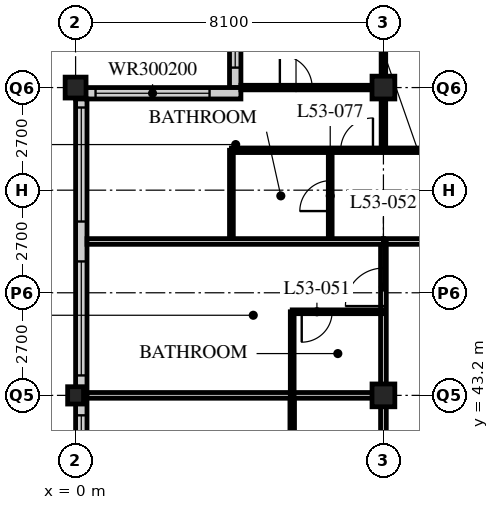
"""IFC4 building model, lengths in metres.
Left out: names, types, materials, properties, quantities, classifications, styles, units other than length and angle.
Written with IfcOpenShell. Run it as: python <this file> out.ifc"""

import sys

from ifc_helpers import new_model, si_unit, direction, frame, frame_2d, origin, origin_2d, place, context, subcontext, project, spatial, rectangle, hollow_rectangle, i_section, extrude, element, fill, save


model = new_model("IFC4")
c1 = context("Model", 3, precision=1e-05, world=origin(), true_north=direction((0.0, 1.0)))
c2 = subcontext(c1, "Body", "Model", "MODEL_VIEW")
j1 = project(units=[si_unit("LENGTHUNIT", "METRE"), si_unit("PLANEANGLEUNIT", "RADIAN")], contexts=[c1])
p1 = place(None, origin())
s1 = spatial("IfcSite", under=j1, at=p1, CompositionType="ELEMENT")
p2 = place(p1, origin())
s2 = spatial("IfcBuilding", under=s1, at=p2, CompositionType="ELEMENT")
p3 = place(p2, frame((0.0, 0.0, 206.4)))
s3 = spatial("IfcBuildingStorey", under=s2, at=p3, CompositionType="ELEMENT", Elevation=206.4)
p4 = place(p3, frame((0.0, 43.2, 0.0), z_axis=(0.0, 0.0, 1.0), x_axis=(1.0, 0.0, 0.0)))
e1 = element("IfcColumn", 1, at=p4, inside=s3, PredefinedType="COLUMN", context=c2, shape_type="SweptSolid", body=[
    extrude(i_section(OverallWidth=0.418, OverallDepth=0.456, WebThickness=0.042, FlangeThickness=0.067, FilletRadius=0.015, at=origin_2d()), origin(), (0.0, 0.0, 1.0), 3.6),
])
p5 = place(p3, frame((0.0, 51.3, 0.0), z_axis=(0.0, 0.0, 1.0), x_axis=(1.0, 0.0, 0.0)))
e2 = element("IfcColumn", 2, at=p5, inside=s3, PredefinedType="COLUMN", context=c2, shape_type="SweptSolid", body=[
    extrude(hollow_rectangle(XDim=0.55, YDim=0.55, WallThickness=0.045, at=origin_2d()), origin(), (0.0, 0.0, 1.0), 3.6),
])
for number, where, z_axis, x_axis in (
    (3, (8.1, 43.2, 0.0), (0.0, 0.0, 1.0), (1.0, 0.0, 0.0)),
    (4, (8.1, 51.3, 0.0), (0.0, 0.0, 1.0), (1.0, 0.0, 0.0)),
):
    element("IfcColumn", number, at=place(p3, frame(where, z_axis=z_axis, x_axis=x_axis)), inside=s3, PredefinedType="COLUMN", context=c2, shape_type="SweptSolid", body=[
        extrude(hollow_rectangle(XDim=0.6, YDim=0.6, WallThickness=0.05, at=origin_2d()), origin(), (0.0, 0.0, 1.0), 3.6),
    ])
p6 = place(p3, frame((4.2, 55.05, 0.0), z_axis=(0.0, 0.0, 1.0), x_axis=(0.0, -1.0, 0.0)))
e5 = element("IfcWall", 5, at=p6, inside=s3, PredefinedType="SOLIDWALL", context=c2, shape_type="SweptSolid", body=[
    extrude(rectangle(XDim=3.75, YDim=0.3, at=frame_2d((1.875, 0.0))), origin(), (0.0, 0.0, 1.0), 3.39),
])
p7 = place(p6, frame((0.225, 0.0, 0.6)))
e6 = element("IfcOpeningElement", 6, at=p7, cuts=e5, PredefinedType="OPENING", context=c2, shape_type="SweptSolid", body=[
    extrude(rectangle(XDim=3.0, YDim=2.0, at=frame_2d((1.5, 1.0))), frame((0.0, 0.16, 0.0), z_axis=(0.0, -1.0, 0.0), x_axis=(1.0, 0.0, 0.0)), (0.0, 0.0, 1.0), 0.32),
])
p8 = place(p3, frame((4.35, 51.15, 0.0), z_axis=(0.0, 0.0, 1.0), x_axis=(-1.0, 0.0, 0.0)))
e7 = element("IfcWall", 7, at=p8, inside=s3, PredefinedType="SOLIDWALL", context=c2, shape_type="SweptSolid", body=[
    extrude(rectangle(XDim=4.35, YDim=0.3, at=frame_2d((2.175, 0.0))), origin(), (0.0, 0.0, 1.0), 3.39),
])
p9 = place(p8, frame((0.825, 0.0, 0.6)))
e8 = element("IfcOpeningElement", 8, at=p9, cuts=e7, PredefinedType="OPENING", context=c2, shape_type="SweptSolid", body=[
    extrude(rectangle(XDim=3.0, YDim=2.0, at=frame_2d((1.5, 1.0))), frame((0.0, 0.16, 0.0), z_axis=(0.0, -1.0, 0.0), x_axis=(1.0, 0.0, 0.0)), (0.0, 0.0, 1.0), 0.32),
])
p10 = place(p3, frame((0.15, 51.0, 0.0), z_axis=(0.0, 0.0, 1.0), x_axis=(0.0, -1.0, 0.0)))
e9 = element("IfcWall", 9, at=p10, inside=s3, PredefinedType="SOLIDWALL", context=c2, shape_type="SweptSolid", body=[
    extrude(rectangle(XDim=32.1, YDim=0.3, at=frame_2d((16.05, 0.0))), origin(), (0.0, 0.0, 1.0), 3.39),
])
p11 = place(p10, frame((0.225, 0.0, 0.6)))
e10 = element("IfcOpeningElement", 10, at=p11, cuts=e9, PredefinedType="OPENING", context=c2, shape_type="SweptSolid", body=[
    extrude(rectangle(XDim=3.0, YDim=2.4, at=frame_2d((1.5, 1.2))), frame((0.0, 0.16, 0.0), z_axis=(0.0, -1.0, 0.0), x_axis=(1.0, 0.0, 0.0)), (0.0, 0.0, 1.0), 0.32),
])
p12 = place(p10, frame((4.275, 0.0, 0.6)))
e11 = element("IfcOpeningElement", 11, at=p12, cuts=e9, PredefinedType="OPENING", context=c2, shape_type="SweptSolid", body=[
    extrude(rectangle(XDim=3.0, YDim=2.4, at=frame_2d((1.5, 1.2))), frame((0.0, 0.16, 0.0), z_axis=(0.0, -1.0, 0.0), x_axis=(1.0, 0.0, 0.0)), (0.0, 0.0, 1.0), 0.32),
])
p13 = place(p10, frame((8.325, 0.0, 0.6)))
e12 = element("IfcOpeningElement", 12, at=p13, cuts=e9, PredefinedType="OPENING", context=c2, shape_type="SweptSolid", body=[
    extrude(rectangle(XDim=3.0, YDim=2.4, at=frame_2d((1.5, 1.2))), frame((0.0, 0.16, 0.0), z_axis=(0.0, -1.0, 0.0), x_axis=(1.0, 0.0, 0.0)), (0.0, 0.0, 1.0), 0.32),
])
p14 = place(p10, frame((12.375, 0.0, 0.6)))
e13 = element("IfcOpeningElement", 13, at=p14, cuts=e9, PredefinedType="OPENING", context=c2, shape_type="SweptSolid", body=[
    extrude(rectangle(XDim=3.0, YDim=2.4, at=frame_2d((1.5, 1.2))), frame((0.0, 0.16, 0.0), z_axis=(0.0, -1.0, 0.0), x_axis=(1.0, 0.0, 0.0)), (0.0, 0.0, 1.0), 0.32),
])
p15 = place(p10, frame((16.425, 0.0, 0.6)))
e14 = element("IfcOpeningElement", 14, at=p15, cuts=e9, PredefinedType="OPENING", context=c2, shape_type="SweptSolid", body=[
    extrude(rectangle(XDim=3.0, YDim=2.4, at=frame_2d((1.5, 1.2))), frame((0.0, 0.16, 0.0), z_axis=(0.0, -1.0, 0.0), x_axis=(1.0, 0.0, 0.0)), (0.0, 0.0, 1.0), 0.32),
])
p16 = place(p10, frame((20.475, 0.0, 0.6)))
e15 = element("IfcOpeningElement", 15, at=p16, cuts=e9, PredefinedType="OPENING", context=c2, shape_type="SweptSolid", body=[
    extrude(rectangle(XDim=3.0, YDim=2.4, at=frame_2d((1.5, 1.2))), frame((0.0, 0.16, 0.0), z_axis=(0.0, -1.0, 0.0), x_axis=(1.0, 0.0, 0.0)), (0.0, 0.0, 1.0), 0.32),
])
p17 = place(p10, frame((24.525, 0.0, 0.6)))
e16 = element("IfcOpeningElement", 16, at=p17, cuts=e9, PredefinedType="OPENING", context=c2, shape_type="SweptSolid", body=[
    extrude(rectangle(XDim=3.0, YDim=2.4, at=frame_2d((1.5, 1.2))), frame((0.0, 0.16, 0.0), z_axis=(0.0, -1.0, 0.0), x_axis=(1.0, 0.0, 0.0)), (0.0, 0.0, 1.0), 0.32),
])
p18 = place(p10, frame((28.575, 0.0, 0.6)))
e17 = element("IfcOpeningElement", 17, at=p18, cuts=e9, PredefinedType="OPENING", context=c2, shape_type="SweptSolid", body=[
    extrude(rectangle(XDim=3.0, YDim=2.4, at=frame_2d((1.5, 1.2))), frame((0.0, 0.16, 0.0), z_axis=(0.0, -1.0, 0.0), x_axis=(1.0, 0.0, 0.0)), (0.0, 0.0, 1.0), 0.32),
])
p19 = place(p3, frame((8.1, 47.25, 0.0), z_axis=(0.0, 0.0, 1.0), x_axis=(1.0, 0.0, 0.0)))
e18 = element("IfcWall", 18, at=p19, inside=s3, PredefinedType="PARTITIONING", context=c2, shape_type="SweptSolid", body=[
    extrude(rectangle(XDim=36.45, YDim=0.15, at=frame_2d((18.225, 0.0))), origin(), (0.0, 0.0, 1.0), 3.39),
])
p20 = place(p19, frame((4.45, 0.0, 0.0)))
e19 = element("IfcOpeningElement", 19, at=p20, cuts=e18, PredefinedType="OPENING", context=c2, shape_type="SweptSolid", body=[
    extrude(rectangle(XDim=1.0, YDim=2.1, at=frame_2d((0.5, 1.05))), frame((0.0, 0.085, 0.0), z_axis=(0.0, -1.0, 0.0), x_axis=(1.0, 0.0, 0.0)), (0.0, 0.0, 1.0), 0.17),
])
p21 = place(p19, frame((12.55, 0.0, 0.0)))
e20 = element("IfcOpeningElement", 20, at=p21, cuts=e18, PredefinedType="OPENING", context=c2, shape_type="SweptSolid", body=[
    extrude(rectangle(XDim=1.0, YDim=2.1, at=frame_2d((0.5, 1.05))), frame((0.0, 0.085, 0.0), z_axis=(0.0, -1.0, 0.0), x_axis=(1.0, 0.0, 0.0)), (0.0, 0.0, 1.0), 0.17),
])
p22 = place(p19, frame((30.7, 0.0, 0.0)))
e21 = element("IfcOpeningElement", 21, at=p22, cuts=e18, PredefinedType="OPENING", context=c2, shape_type="SweptSolid", body=[
    extrude(rectangle(XDim=1.0, YDim=2.1, at=frame_2d((0.5, 1.05))), frame((0.0, 0.085, 0.0), z_axis=(0.0, -1.0, 0.0), x_axis=(1.0, 0.0, 0.0)), (0.0, 0.0, 1.0), 0.17),
])
p23 = place(p19, frame((33.925, 0.0, 0.0)))
e22 = element("IfcOpeningElement", 22, at=p23, cuts=e18, PredefinedType="OPENING", context=c2, shape_type="SweptSolid", body=[
    extrude(rectangle(XDim=1.0, YDim=2.1, at=frame_2d((0.5, 1.05))), frame((0.0, 0.085, 0.0), z_axis=(0.0, -1.0, 0.0), x_axis=(1.0, 0.0, 0.0)), (0.0, 0.0, 1.0), 0.17),
])
p24 = place(p19, frame((1.525, 0.0, 0.0)))
e23 = element("IfcOpeningElement", 23, at=p24, cuts=e18, PredefinedType="OPENING", context=c2, shape_type="SweptSolid", body=[
    extrude(rectangle(XDim=1.0, YDim=2.1, at=frame_2d((0.5, 1.05))), frame((0.0, 0.085, 0.0), z_axis=(0.0, -1.0, 0.0), x_axis=(1.0, 0.0, 0.0)), (0.0, 0.0, 1.0), 0.17),
])
p25 = place(p3, frame((8.1, 18.9, 0.0), z_axis=(0.0, 0.0, 1.0), x_axis=(0.0, 1.0, 0.0)))
e24 = element("IfcWall", 24, at=p25, inside=s3, PredefinedType="PARTITIONING", context=c2, shape_type="SweptSolid", body=[
    extrude(rectangle(XDim=28.35, YDim=0.15, at=frame_2d((14.175, 0.0))), origin(), (0.0, 0.0, 1.0), 2.778),
])
p26 = place(p25, frame((0.9, 0.0, 0.0)))
e25 = element("IfcOpeningElement", 25, at=p26, cuts=e24, PredefinedType="OPENING", context=c2, shape_type="SweptSolid", body=[
    extrude(rectangle(XDim=1.0, YDim=2.1, at=frame_2d((0.5, 1.05))), frame((0.0, 0.085, 0.0), z_axis=(0.0, -1.0, 0.0), x_axis=(1.0, 0.0, 0.0)), (0.0, 0.0, 1.0), 0.17),
])
p27 = place(p25, frame((17.1, 0.0, 0.0)))
e26 = element("IfcOpeningElement", 26, at=p27, cuts=e24, PredefinedType="OPENING", context=c2, shape_type="SweptSolid", body=[
    extrude(rectangle(XDim=1.0, YDim=2.1, at=frame_2d((0.5, 1.05))), frame((0.0, 0.085, 0.0), z_axis=(0.0, -1.0, 0.0), x_axis=(1.0, 0.0, 0.0)), (0.0, 0.0, 1.0), 0.17),
])
p28 = place(p25, frame((26.65, 0.0, 0.0)))
e27 = element("IfcOpeningElement", 27, at=p28, cuts=e24, PredefinedType="OPENING", context=c2, shape_type="SweptSolid", body=[
    extrude(rectangle(XDim=1.0, YDim=2.1, at=frame_2d((0.5, 1.05))), frame((0.0, 0.085, 0.0), z_axis=(0.0, -1.0, 0.0), x_axis=(1.0, 0.0, 0.0)), (0.0, 0.0, 1.0), 0.17),
])
p29 = place(p3, frame((5.7, 18.9, 0.0), z_axis=(0.0, 0.0, 1.0), x_axis=(0.0, 1.0, 0.0)))
e28 = element("IfcWall", 28, at=p29, inside=s3, PredefinedType="PARTITIONING", context=c2, shape_type="SweptSolid", body=[
    extrude(rectangle(XDim=24.3, YDim=0.12, at=frame_2d((12.15, 0.0))), origin(), (0.0, 0.0, 1.0), 3.39),
])
p30 = place(p29, frame((0.975, 0.0, 0.0)))
e29 = element("IfcOpeningElement", 29, at=p30, cuts=e28, PredefinedType="OPENING", context=c2, shape_type="SweptSolid", body=[
    extrude(rectangle(XDim=0.85, YDim=2.1, at=frame_2d((0.425, 1.05))), frame((0.0, 0.07, 0.0), z_axis=(0.0, -1.0, 0.0), x_axis=(1.0, 0.0, 0.0)), (0.0, 0.0, 1.0), 0.14),
])
p31 = place(p29, frame((8.425, 0.0, 0.0)))
e30 = element("IfcOpeningElement", 30, at=p31, cuts=e28, PredefinedType="OPENING", context=c2, shape_type="SweptSolid", body=[
    extrude(rectangle(XDim=0.85, YDim=2.1, at=frame_2d((0.425, 1.05))), frame((0.0, 0.07, 0.0), z_axis=(0.0, -1.0, 0.0), x_axis=(1.0, 0.0, 0.0)), (0.0, 0.0, 1.0), 0.14),
])
p32 = place(p29, frame((12.475, 0.0, 0.0)))
e31 = element("IfcOpeningElement", 31, at=p32, cuts=e28, PredefinedType="OPENING", context=c2, shape_type="SweptSolid", body=[
    extrude(rectangle(XDim=0.85, YDim=2.1, at=frame_2d((0.425, 1.05))), frame((0.0, 0.07, 0.0), z_axis=(0.0, -1.0, 0.0), x_axis=(1.0, 0.0, 0.0)), (0.0, 0.0, 1.0), 0.14),
])
p33 = place(p29, frame((17.175, 0.0, 0.0)))
e32 = element("IfcOpeningElement", 32, at=p33, cuts=e28, PredefinedType="OPENING", context=c2, shape_type="SweptSolid", body=[
    extrude(rectangle(XDim=0.85, YDim=2.1, at=frame_2d((0.425, 1.05))), frame((0.0, 0.07, 0.0), z_axis=(0.0, -1.0, 0.0), x_axis=(1.0, 0.0, 0.0)), (0.0, 0.0, 1.0), 0.14),
])
p34 = place(p29, frame((20.575, 0.0, 0.0)))
e33 = element("IfcOpeningElement", 33, at=p34, cuts=e28, PredefinedType="OPENING", context=c2, shape_type="SweptSolid", body=[
    extrude(rectangle(XDim=0.85, YDim=2.1, at=frame_2d((0.425, 1.05))), frame((0.0, 0.07, 0.0), z_axis=(0.0, -1.0, 0.0), x_axis=(1.0, 0.0, 0.0)), (0.0, 0.0, 1.0), 0.14),
])
p35 = place(p3, frame((8.1, 43.2, 0.0), z_axis=(0.0, 0.0, 1.0), x_axis=(-1.0, 0.0, 0.0)))
e34 = element("IfcWall", 34, at=p35, inside=s3, PredefinedType="PARTITIONING", context=c2, shape_type="SweptSolid", body=[
    extrude(rectangle(XDim=7.8, YDim=0.15, at=frame_2d((3.9, 0.0))), origin(), (0.0, 0.0, 1.0), 2.778),
])
p36 = place(p3, frame((5.7, 43.2, 0.0), z_axis=(0.0, 0.0, 1.0), x_axis=(0.0, 1.0, 0.0)))
e35 = element("IfcWall", 35, at=p36, inside=s3, PredefinedType="PARTITIONING", context=c2, shape_type="SweptSolid", body=[
    extrude(rectangle(XDim=2.2, YDim=0.1, at=frame_2d((1.1, 0.0))), origin(), (0.0, 0.0, 1.0), 3.39),
])
p37 = place(p3, frame((8.1, 45.4, 0.0), z_axis=(0.0, 0.0, 1.0), x_axis=(-1.0, 0.0, 0.0)))
e36 = element("IfcWall", 36, at=p37, inside=s3, PredefinedType="PARTITIONING", context=c2, shape_type="SweptSolid", body=[
    extrude(rectangle(XDim=2.4, YDim=0.1, at=frame_2d((1.2, 0.0))), origin(), (0.0, 0.0, 1.0), 3.39),
])
p38 = place(p37, frame((1.35, 0.0, 0.0)))
e37 = element("IfcOpeningElement", 37, at=p38, cuts=e36, PredefinedType="OPENING", context=c2, shape_type="SweptSolid", body=[
    extrude(rectangle(XDim=0.8, YDim=2.1, at=frame_2d((0.4, 1.05))), frame((0.0, 0.06, 0.0), z_axis=(0.0, -1.0, 0.0), x_axis=(1.0, 0.0, 0.0)), (0.0, 0.0, 1.0), 0.12),
])
p39 = place(p3, frame((6.7, 47.25, 0.0), z_axis=(0.0, 0.0, 1.0), x_axis=(0.0, 1.0, 0.0)))
e38 = element("IfcWall", 38, at=p39, inside=s3, PredefinedType="PARTITIONING", context=c2, shape_type="SweptSolid", body=[
    extrude(rectangle(XDim=2.4, YDim=0.1, at=frame_2d((1.2, 0.0))), origin(), (0.0, 0.0, 1.0), 3.39),
])
p40 = place(p39, frame((0.8, 0.0, 0.0)))
e39 = element("IfcOpeningElement", 39, at=p40, cuts=e38, PredefinedType="OPENING", context=c2, shape_type="SweptSolid", body=[
    extrude(rectangle(XDim=0.8, YDim=2.1, at=frame_2d((0.4, 1.05))), frame((0.0, 0.06, 0.0), z_axis=(0.0, -1.0, 0.0), x_axis=(1.0, 0.0, 0.0)), (0.0, 0.0, 1.0), 0.12),
])
p41 = place(p3, frame((4.1, 47.25, 0.0), z_axis=(0.0, 0.0, 1.0), x_axis=(0.0, 1.0, 0.0)))
e40 = element("IfcWall", 40, at=p41, inside=s3, PredefinedType="PARTITIONING", context=c2, shape_type="SweptSolid", body=[
    extrude(rectangle(XDim=2.4, YDim=0.1, at=frame_2d((1.2, 0.0))), origin(), (0.0, 0.0, 1.0), 3.39),
])
p42 = place(p3, frame((4.1, 49.65, 0.0), z_axis=(0.0, 0.0, 1.0), x_axis=(1.0, 0.0, 0.0)))
e41 = element("IfcWall", 41, at=p42, inside=s3, PredefinedType="PARTITIONING", context=c2, shape_type="SweptSolid", body=[
    extrude(rectangle(XDim=32.35, YDim=0.12, at=frame_2d((16.175, 0.0))), origin(), (0.0, 0.0, 1.0), 3.39),
])
p43 = place(p42, frame((9.025, 0.0, 0.0)))
e42 = element("IfcOpeningElement", 42, at=p43, cuts=e41, PredefinedType="OPENING", context=c2, shape_type="SweptSolid", body=[
    extrude(rectangle(XDim=0.85, YDim=2.1, at=frame_2d((0.425, 1.05))), frame((0.0, 0.07, 0.0), z_axis=(0.0, -1.0, 0.0), x_axis=(1.0, 0.0, 0.0)), (0.0, 0.0, 1.0), 0.14),
])
p44 = place(p42, frame((12.425, 0.0, 0.0)))
e43 = element("IfcOpeningElement", 43, at=p44, cuts=e41, PredefinedType="OPENING", context=c2, shape_type="SweptSolid", body=[
    extrude(rectangle(XDim=0.85, YDim=2.1, at=frame_2d((0.425, 1.05))), frame((0.0, 0.07, 0.0), z_axis=(0.0, -1.0, 0.0), x_axis=(1.0, 0.0, 0.0)), (0.0, 0.0, 1.0), 0.14),
])
p45 = place(p42, frame((17.125, 0.0, 0.0)))
e44 = element("IfcOpeningElement", 44, at=p45, cuts=e41, PredefinedType="OPENING", context=c2, shape_type="SweptSolid", body=[
    extrude(rectangle(XDim=0.85, YDim=2.1, at=frame_2d((0.425, 1.05))), frame((0.0, 0.07, 0.0), z_axis=(0.0, -1.0, 0.0), x_axis=(1.0, 0.0, 0.0)), (0.0, 0.0, 1.0), 0.14),
])
p46 = place(p42, frame((24.575, 0.0, 0.0)))
e45 = element("IfcOpeningElement", 45, at=p46, cuts=e41, PredefinedType="OPENING", context=c2, shape_type="SweptSolid", body=[
    extrude(rectangle(XDim=0.85, YDim=2.1, at=frame_2d((0.425, 1.05))), frame((0.0, 0.07, 0.0), z_axis=(0.0, -1.0, 0.0), x_axis=(1.0, 0.0, 0.0)), (0.0, 0.0, 1.0), 0.14),
])
p47 = place(p42, frame((28.625, 0.0, 0.0)))
e46 = element("IfcOpeningElement", 46, at=p47, cuts=e41, PredefinedType="OPENING", context=c2, shape_type="SweptSolid", body=[
    extrude(rectangle(XDim=0.85, YDim=2.1, at=frame_2d((0.425, 1.05))), frame((0.0, 0.07, 0.0), z_axis=(0.0, -1.0, 0.0), x_axis=(1.0, 0.0, 0.0)), (0.0, 0.0, 1.0), 0.14),
])
p48 = place(p42, frame((6.725, 0.0, 0.0)))
e47 = element("IfcOpeningElement", 47, at=p48, cuts=e41, PredefinedType="OPENING", context=c2, shape_type="SweptSolid", body=[
    extrude(rectangle(XDim=0.85, YDim=2.1, at=frame_2d((0.425, 1.05))), frame((0.0, 0.07, 0.0), z_axis=(0.0, -1.0, 0.0), x_axis=(1.0, 0.0, 0.0)), (0.0, 0.0, 1.0), 0.14),
])
p49 = place(p42, frame((2.875, 0.0, 0.0)))
e48 = element("IfcOpeningElement", 48, at=p49, cuts=e41, PredefinedType="OPENING", context=c2, shape_type="SweptSolid", body=[
    extrude(rectangle(XDim=0.85, YDim=2.1, at=frame_2d((0.425, 1.05))), frame((0.0, 0.07, 0.0), z_axis=(0.0, -1.0, 0.0), x_axis=(1.0, 0.0, 0.0)), (0.0, 0.0, 1.0), 0.14),
])
p50 = place(p3, frame((8.1, 49.65, 0.0), z_axis=(0.0, 0.0, 1.0), x_axis=(0.0, 1.0, 0.0)))
e49 = element("IfcWall", 49, at=p50, inside=s3, PredefinedType="PARTITIONING", context=c2, shape_type="SweptSolid", body=[
    extrude(rectangle(XDim=5.4, YDim=0.12, at=frame_2d((2.7, 0.0))), origin(), (0.0, 0.0, 1.0), 2.778),
])
p51 = place(p3, frame((8.1, 51.3, 0.0), z_axis=(0.0, 0.0, 1.0), x_axis=(-1.0, 0.0, 0.0)))
e50 = element("IfcWall", 50, at=p51, inside=s3, PredefinedType="PARTITIONING", context=c2, shape_type="SweptSolid", body=[
    extrude(rectangle(XDim=3.75, YDim=0.12, at=frame_2d((1.875, 0.0))), origin(), (0.0, 0.0, 1.0), 2.778),
])
p52 = place(p51, frame((1.875, 0.0, 0.0)))
e51 = element("IfcOpeningElement", 51, at=p52, cuts=e50, PredefinedType="OPENING", context=c2, shape_type="SweptSolid", body=[
    extrude(rectangle(XDim=0.85, YDim=2.1, at=frame_2d((0.425, 1.05))), frame((0.0, 0.07, 0.0), z_axis=(0.0, -1.0, 0.0), x_axis=(1.0, 0.0, 0.0)), (0.0, 0.0, 1.0), 0.14),
])
p53 = place(p3, frame((0.3, 47.25, 0.0), z_axis=(0.0, 0.0, 1.0), x_axis=(1.0, 0.0, 0.0)))
e52 = element("IfcWall", 52, at=p53, inside=s3, PredefinedType="PARTITIONING", context=c2, shape_type="SweptSolid", body=[
    extrude(rectangle(XDim=7.8, YDim=0.15, at=frame_2d((3.9, 0.0))), origin(), (0.0, 0.0, 1.0), 3.39),
])
p54 = place(p7, origin())
e53 = element("IfcWindow", 53, at=p54, inside=s3, PartitioningType="SINGLE_PANEL", PredefinedType="WINDOW", context=c2, shape_type="SweptSolid", body=[
    extrude(rectangle(XDim=3.0, YDim=2.0, at=frame_2d((1.5, 1.0))), frame((0.0, 0.03, 0.0), z_axis=(0.0, -1.0, 0.0), x_axis=(1.0, 0.0, 0.0)), (0.0, 0.0, 1.0), 0.06),
])
fill(e6, e53)
p55 = place(p9, origin())
e54 = element("IfcWindow", 54, at=p55, inside=s3, PartitioningType="SINGLE_PANEL", PredefinedType="WINDOW", context=c2, shape_type="SweptSolid", body=[
    extrude(rectangle(XDim=3.0, YDim=2.0, at=frame_2d((1.5, 1.0))), frame((0.0, 0.03, 0.0), z_axis=(0.0, -1.0, 0.0), x_axis=(1.0, 0.0, 0.0)), (0.0, 0.0, 1.0), 0.06),
])
fill(e8, e54)
p56 = place(p11, origin())
e55 = element("IfcWindow", 55, at=p56, inside=s3, PartitioningType="SINGLE_PANEL", PredefinedType="WINDOW", context=c2, shape_type="SweptSolid", body=[
    extrude(rectangle(XDim=3.0, YDim=2.4, at=frame_2d((1.5, 1.2))), frame((0.0, 0.03, 0.0), z_axis=(0.0, -1.0, 0.0), x_axis=(1.0, 0.0, 0.0)), (0.0, 0.0, 1.0), 0.06),
])
fill(e10, e55)
p57 = place(p12, origin())
e56 = element("IfcWindow", 56, at=p57, inside=s3, PartitioningType="SINGLE_PANEL", PredefinedType="WINDOW", context=c2, shape_type="SweptSolid", body=[
    extrude(rectangle(XDim=3.0, YDim=2.4, at=frame_2d((1.5, 1.2))), frame((0.0, 0.03, 0.0), z_axis=(0.0, -1.0, 0.0), x_axis=(1.0, 0.0, 0.0)), (0.0, 0.0, 1.0), 0.06),
])
fill(e11, e56)
p58 = place(p13, origin())
e57 = element("IfcWindow", 57, at=p58, inside=s3, PartitioningType="SINGLE_PANEL", PredefinedType="WINDOW", context=c2, shape_type="SweptSolid", body=[
    extrude(rectangle(XDim=3.0, YDim=2.4, at=frame_2d((1.5, 1.2))), frame((0.0, 0.03, 0.0), z_axis=(0.0, -1.0, 0.0), x_axis=(1.0, 0.0, 0.0)), (0.0, 0.0, 1.0), 0.06),
])
fill(e12, e57)
p59 = place(p38, origin())
e58 = element("IfcDoor", 58, at=p59, inside=s3, OperationType="SINGLE_SWING_RIGHT", PredefinedType="DOOR", context=c2, shape_type="SweptSolid", body=[
    extrude(rectangle(XDim=0.8, YDim=2.1, at=frame_2d((0.4, 1.05))), frame((0.0, 0.025, 0.0), z_axis=(0.0, -1.0, 0.0), x_axis=(1.0, 0.0, 0.0)), (0.0, 0.0, 1.0), 0.05),
])
fill(e37, e58)
p60 = place(p28, origin())
e59 = element("IfcDoor", 59, at=p60, inside=s3, OperationType="SINGLE_SWING_LEFT", PredefinedType="DOOR", context=c2, shape_type="SweptSolid", body=[
    extrude(rectangle(XDim=1.0, YDim=2.1, at=frame_2d((0.5, 1.05))), frame((0.0, 0.025, 0.0), z_axis=(0.0, -1.0, 0.0), x_axis=(1.0, 0.0, 0.0)), (0.0, 0.0, 1.0), 0.05),
])
fill(e27, e59)
p61 = place(p40, origin())
e60 = element("IfcDoor", 60, at=p61, inside=s3, OperationType="SINGLE_SWING_LEFT", PredefinedType="DOOR", context=c2, shape_type="SweptSolid", body=[
    extrude(rectangle(XDim=0.8, YDim=2.1, at=frame_2d((0.4, 1.05))), frame((0.0, 0.025, 0.0), z_axis=(0.0, -1.0, 0.0), x_axis=(1.0, 0.0, 0.0)), (0.0, 0.0, 1.0), 0.05),
])
fill(e39, e60)
p62 = place(p49, origin())
e61 = element("IfcDoor", 61, at=p62, inside=s3, OperationType="SINGLE_SWING_RIGHT", PredefinedType="DOOR", context=c2, shape_type="SweptSolid", body=[
    extrude(rectangle(XDim=0.85, YDim=2.1, at=frame_2d((0.425, 1.05))), frame((0.0, 0.025, 0.0), z_axis=(0.0, -1.0, 0.0), x_axis=(1.0, 0.0, 0.0)), (0.0, 0.0, 1.0), 0.05),
])
fill(e48, e61)
p63 = place(p52, origin())
e62 = element("IfcDoor", 62, at=p63, inside=s3, OperationType="SINGLE_SWING_LEFT", PredefinedType="DOOR", context=c2, shape_type="SweptSolid", body=[
    extrude(rectangle(XDim=0.85, YDim=2.1, at=frame_2d((0.425, 1.05))), frame((0.0, 0.025, 0.0), z_axis=(0.0, -1.0, 0.0), x_axis=(1.0, 0.0, 0.0)), (0.0, 0.0, 1.0), 0.05),
])
fill(e51, e62)
save(model, sys.argv[1])
